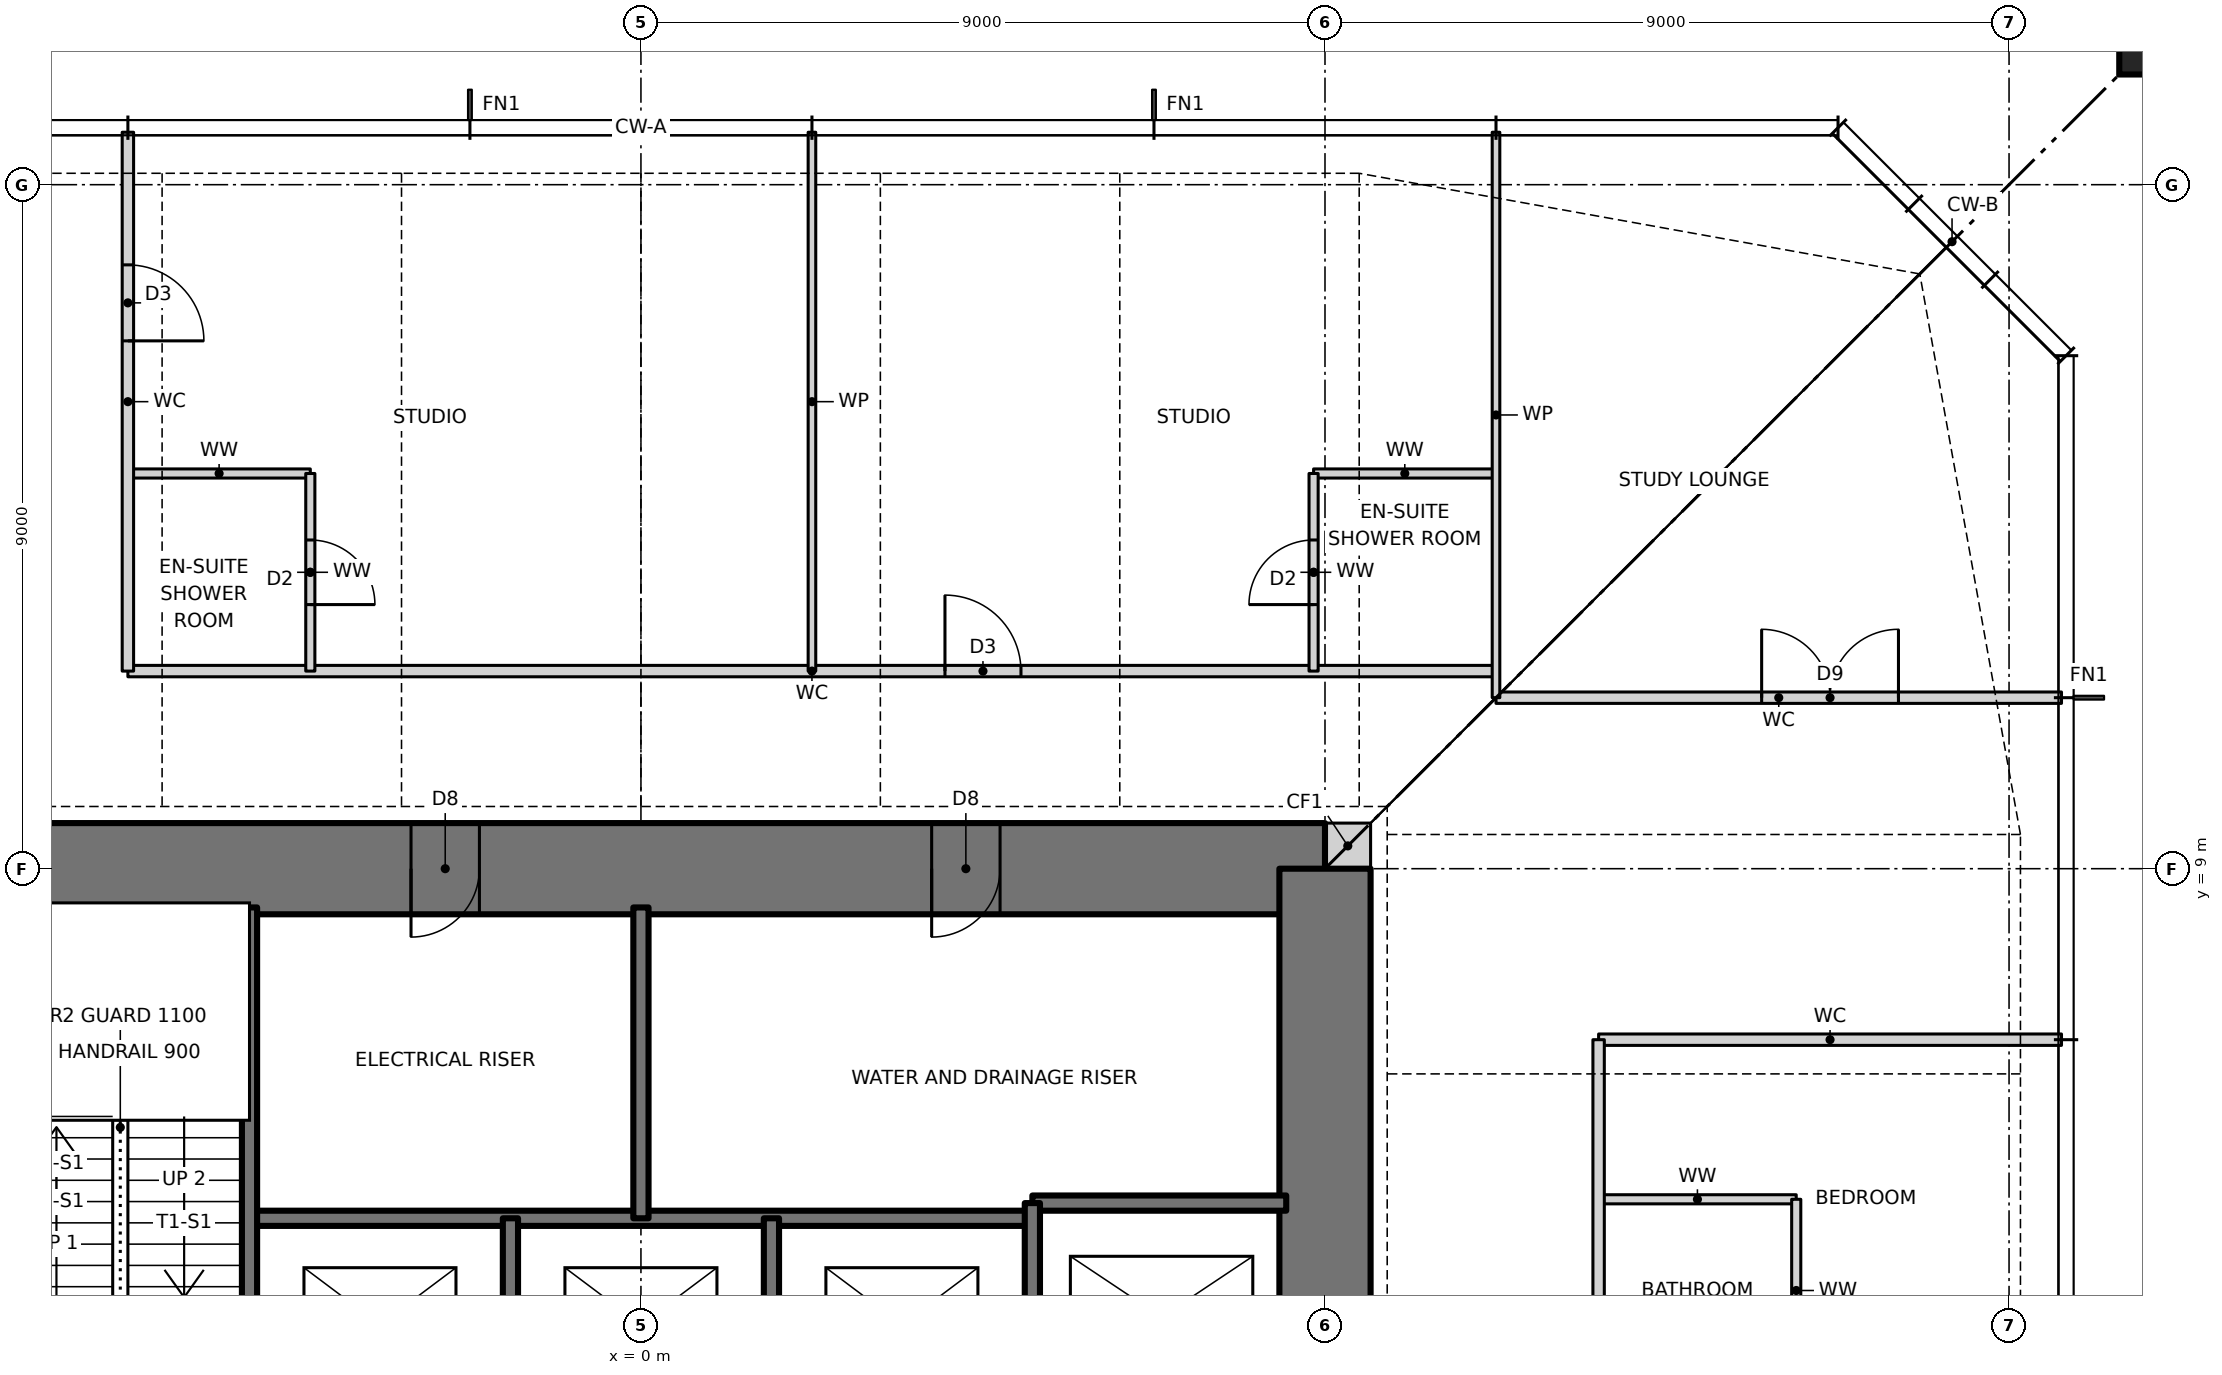
"""IFC4 building model, lengths in metres.
Left out: names, types, materials, properties, quantities, classifications, styles, units other than length and angle.
Written with IfcOpenShell. Run it as: python <this file> out.ifc"""

import sys

from ifc_helpers import new_model, si_unit, direction, frame, frame_2d, origin, origin_2d, place, context, subcontext, project, spatial, rectangle, i_section, extrude, element, fill, save


model = new_model("IFC4")
c1 = context("Model", 3, precision=1e-05, world=origin(), true_north=direction((0.0, 1.0)))
c2 = subcontext(c1, "Body", "Model", "MODEL_VIEW")
j1 = project(units=[si_unit("LENGTHUNIT", "METRE"), si_unit("PLANEANGLEUNIT", "RADIAN")], contexts=[c1])
p1 = place(None, origin())
s1 = spatial("IfcSite", under=j1, at=p1, CompositionType="ELEMENT")
p2 = place(p1, origin())
s2 = spatial("IfcBuilding", under=s1, at=p2, CompositionType="ELEMENT")
p3 = place(p2, frame((0.0, 0.0, 205.5)))
s3 = spatial("IfcBuildingStorey", under=s2, at=p3, CompositionType="ELEMENT", Elevation=205.5)
p4 = place(p3, frame((21.65, 21.65, 0.0), z_axis=(0.0, 0.0, 1.0), x_axis=(1.0, 0.0, 0.0)))
e1 = element("IfcColumn", 1, at=p4, inside=s3, PredefinedType="COLUMN", context=c2, shape_type="SweptSolid", body=[
    extrude(rectangle(XDim=4.4, YDim=4.4, at=origin_2d()), origin(), (0.0, 0.0, 1.0), 3.5),
    extrude(i_section(OverallWidth=0.478, OverallDepth=0.599, WebThickness=0.1, FlangeThickness=0.14, at=origin_2d()), origin(), (0.0, 0.0, 1.0), 3.5),
])
p5 = place(p3, frame((9.0, 9.3, 0.0), z_axis=(0.0, 0.0, 1.0), x_axis=(1.0, 0.0, 0.0)))
e2 = element("IfcWall", 2, at=p5, inside=s3, PredefinedType="SOLIDWALL", context=c2, shape_type="SweptSolid", body=[
    extrude(rectangle(XDim=0.6, YDim=0.6, at=frame_2d((0.3, 0.0))), origin(), (0.0, 0.0, 1.0), 3.5),
])
p6 = place(p3, frame((9.0, 9.0, 0.0), z_axis=(0.0, 0.0, 1.0), x_axis=(-1.0, 0.0, 0.0)))
e3 = element("IfcWall", 3, at=p6, inside=s3, PredefinedType="SHEAR", context=c2, shape_type="SweptSolid", body=[
    extrude(rectangle(XDim=18.0, YDim=1.2, at=frame_2d((9.0, 0.0))), origin(), (0.0, 0.0, 1.0), 3.5),
])
p7 = place(p6, frame((11.125, 0.0, 0.0)))
e4 = element("IfcOpeningElement", 4, at=p7, cuts=e3, PredefinedType="OPENING", context=c2, shape_type="SweptSolid", body=[
    extrude(rectangle(XDim=0.9, YDim=2.1, at=frame_2d((0.45, 1.05))), frame((0.0, 0.61, 0.0), z_axis=(0.0, -1.0, 0.0), x_axis=(1.0, 0.0, 0.0)), (0.0, 0.0, 1.0), 1.22),
])
p8 = place(p6, frame((4.275, 0.0, 0.0)))
e5 = element("IfcOpeningElement", 5, at=p8, cuts=e3, PredefinedType="OPENING", context=c2, shape_type="SweptSolid", body=[
    extrude(rectangle(XDim=0.9, YDim=2.1, at=frame_2d((0.45, 1.05))), frame((0.0, 0.61, 0.0), z_axis=(0.0, -1.0, 0.0), x_axis=(1.0, 0.0, 0.0)), (0.0, 0.0, 1.0), 1.22),
])
p9 = place(p3, frame((9.0, -9.0, 0.0), z_axis=(0.0, 0.0, 1.0), x_axis=(0.0, 1.0, 0.0)))
e6 = element("IfcWall", 6, at=p9, inside=s3, PredefinedType="SHEAR", context=c2, shape_type="SweptSolid", body=[
    extrude(rectangle(XDim=18.0, YDim=1.2, at=frame_2d((9.0, 0.0))), origin(), (0.0, 0.0, 1.0), 3.5),
])
p10 = place(p9, frame((8.5, 0.0, 0.0)))
e7 = element("IfcOpeningElement", 7, at=p10, cuts=e6, PredefinedType="OPENING", context=c2, shape_type="SweptSolid", body=[
    extrude(rectangle(XDim=1.0, YDim=2.1, at=frame_2d((0.5, 1.05))), frame((0.0, 0.61, 0.0), z_axis=(0.0, -1.0, 0.0), x_axis=(1.0, 0.0, 0.0)), (0.0, 0.0, 1.0), 1.22),
])
p11 = place(p3, frame((-5.15, 4.4, 0.0), z_axis=(0.0, 0.0, 1.0), x_axis=(1.0, 0.0, 0.0)))
e8 = element("IfcWall", 8, at=p11, inside=s3, PredefinedType="SOLIDWALL", context=c2, shape_type="SweptSolid", body=[
    extrude(rectangle(XDim=10.3, YDim=0.2, at=frame_2d((5.15, 0.0))), origin(), (0.0, 0.0, 1.0), 3.5),
])
p12 = place(p3, frame((5.15, 4.6, 0.0), z_axis=(0.0, 0.0, 1.0), x_axis=(1.0, 0.0, 0.0)))
e9 = element("IfcWall", 9, at=p12, inside=s3, PredefinedType="SOLIDWALL", context=c2, shape_type="SweptSolid", body=[
    extrude(rectangle(XDim=3.34, YDim=0.2, at=frame_2d((1.67, 0.0))), origin(), (0.0, 0.0, 1.0), 3.5),
])
p13 = place(p3, frame((12.6, 4.65, 0.0), z_axis=(0.0, 0.0, 1.0), x_axis=(1.0, 0.0, 0.0)))
e10 = element("IfcWall", 10, at=p13, inside=s3, PredefinedType="PARTITIONING", context=c2, shape_type="SweptSolid", body=[
    extrude(rectangle(XDim=2.6, YDim=0.12, at=frame_2d((1.3, 0.0))), origin(), (0.0, 0.0, 1.0), 3.2),
])
p14 = place(p3, frame((12.6, 6.75, 0.0), z_axis=(0.0, 0.0, 1.0), x_axis=(1.0, 0.0, 0.0)))
e11 = element("IfcWall", 11, at=p14, inside=s3, PredefinedType="PARTITIONING", context=c2, shape_type="SweptSolid", body=[
    extrude(rectangle(XDim=6.09, YDim=0.15, at=frame_2d((3.045, 0.0))), origin(), (0.0, 0.0, 1.0), 3.2),
])
p15 = place(p3, frame((11.25, 11.25, 0.0), z_axis=(0.0, 0.0, 1.0), x_axis=(1.0, 0.0, 0.0)))
e12 = element("IfcWall", 12, at=p15, inside=s3, PredefinedType="PARTITIONING", context=c2, shape_type="SweptSolid", body=[
    extrude(rectangle(XDim=7.44, YDim=0.15, at=frame_2d((3.72, 0.0))), origin(), (0.0, 0.0, 1.0), 3.2),
])
p16 = place(p15, frame((3.495, 0.0, 0.0)))
e13 = element("IfcOpeningElement", 13, at=p16, cuts=e12, PredefinedType="OPENING", context=c2, shape_type="SweptSolid", body=[
    extrude(rectangle(XDim=1.8, YDim=2.1, at=frame_2d((0.9, 1.05))), frame((0.0, 0.085, 0.0), z_axis=(0.0, -1.0, 0.0), x_axis=(1.0, 0.0, 0.0)), (0.0, 0.0, 1.0), 0.17),
])
p17 = place(p3, frame((-6.75, 11.6, 0.0), z_axis=(0.0, 0.0, 1.0), x_axis=(1.0, 0.0, 0.0)))
e14 = element("IfcWall", 14, at=p17, inside=s3, PredefinedType="PARTITIONING", context=c2, shape_type="SweptSolid", body=[
    extrude(rectangle(XDim=18.0, YDim=0.15, at=frame_2d((9.0, 0.0))), origin(), (0.0, 0.0, 1.0), 3.2),
])
p18 = place(p17, frame((10.75, 0.0, 0.0)))
e15 = element("IfcOpeningElement", 15, at=p18, cuts=e14, PredefinedType="OPENING", context=c2, shape_type="SweptSolid", body=[
    extrude(rectangle(XDim=1.0, YDim=2.1, at=frame_2d((0.5, 1.05))), frame((0.0, 0.085, 0.0), z_axis=(0.0, -1.0, 0.0), x_axis=(1.0, 0.0, 0.0)), (0.0, 0.0, 1.0), 0.17),
])
for number, where, z_axis, x_axis in (
    (16, (-6.75, 14.2, 0.0), (0.0, 0.0, 1.0), (1.0, 0.0, 0.0)),
    (17, (8.85, 14.2, 0.0), (0.0, 0.0, 1.0), (1.0, 0.0, 0.0)),
    (18, (15.2, 2.25, 0.0), (0.0, 0.0, 1.0), (0.0, 1.0, 0.0)),
):
    element("IfcWall", number, at=place(p3, frame(where, z_axis=z_axis, x_axis=x_axis)), inside=s3, PredefinedType="PARTITIONING", context=c2, shape_type="SweptSolid", body=[
        extrude(rectangle(XDim=2.4, YDim=0.12, at=frame_2d((1.2, 0.0))), origin(), (0.0, 0.0, 1.0), 3.2),
    ])
p19 = place(p3, frame((12.6, -11.25, 0.0), z_axis=(0.0, 0.0, 1.0), x_axis=(0.0, 1.0, 0.0)))
e19 = element("IfcWall", 19, at=p19, inside=s3, PredefinedType="PARTITIONING", context=c2, shape_type="SweptSolid", body=[
    extrude(rectangle(XDim=18.0, YDim=0.15, at=frame_2d((9.0, 0.0))), origin(), (0.0, 0.0, 1.0), 3.2),
])
p20 = place(p19, frame((1.35, 0.0, 0.0)))
e20 = element("IfcOpeningElement", 20, at=p20, cuts=e19, PredefinedType="OPENING", context=c2, shape_type="SweptSolid", body=[
    extrude(rectangle(XDim=1.8, YDim=2.1, at=frame_2d((0.9, 1.05))), frame((0.0, 0.085, 0.0), z_axis=(0.0, -1.0, 0.0), x_axis=(1.0, 0.0, 0.0)), (0.0, 0.0, 1.0), 0.17),
])
p21 = place(p19, frame((5.05, 0.0, 0.0)))
e21 = element("IfcOpeningElement", 21, at=p21, cuts=e19, PredefinedType="OPENING", context=c2, shape_type="SweptSolid", body=[
    extrude(rectangle(XDim=1.0, YDim=2.1, at=frame_2d((0.5, 1.05))), frame((0.0, 0.085, 0.0), z_axis=(0.0, -1.0, 0.0), x_axis=(1.0, 0.0, 0.0)), (0.0, 0.0, 1.0), 0.17),
])
p22 = place(p19, frame((12.1, 0.0, 0.0)))
e22 = element("IfcOpeningElement", 22, at=p22, cuts=e19, PredefinedType="OPENING", context=c2, shape_type="SweptSolid", body=[
    extrude(rectangle(XDim=1.0, YDim=2.1, at=frame_2d((0.5, 1.05))), frame((0.0, 0.085, 0.0), z_axis=(0.0, -1.0, 0.0), x_axis=(1.0, 0.0, 0.0)), (0.0, 0.0, 1.0), 0.17),
])
p23 = place(p3, frame((11.25, 11.25, 0.0), z_axis=(0.0, 0.0, 1.0), x_axis=(0.0, 1.0, 0.0)))
e23 = element("IfcWall", 23, at=p23, inside=s3, PredefinedType="PARTITIONING", context=c2, shape_type="SweptSolid", body=[
    extrude(rectangle(XDim=7.44, YDim=0.1, at=frame_2d((3.72, 0.0))), origin(), (0.0, 0.0, 1.0), 3.2),
])
p24 = place(p3, frame((8.85, 11.6, 0.0), z_axis=(0.0, 0.0, 1.0), x_axis=(0.0, 1.0, 0.0)))
e24 = element("IfcWall", 24, at=p24, inside=s3, PredefinedType="PARTITIONING", context=c2, shape_type="SweptSolid", body=[
    extrude(rectangle(XDim=2.6, YDim=0.12, at=frame_2d((1.3, 0.0))), origin(), (0.0, 0.0, 1.0), 3.2),
])
p25 = place(p24, frame((0.875, 0.0, 0.0)))
e25 = element("IfcOpeningElement", 25, at=p25, cuts=e24, PredefinedType="OPENING", context=c2, shape_type="SweptSolid", body=[
    extrude(rectangle(XDim=0.85, YDim=2.1, at=frame_2d((0.425, 1.05))), frame((0.0, 0.07, 0.0), z_axis=(0.0, -1.0, 0.0), x_axis=(1.0, 0.0, 0.0)), (0.0, 0.0, 1.0), 0.14),
])
p26 = place(p3, frame((5.15, -8.49, 0.0), z_axis=(0.0, 0.0, 1.0), x_axis=(0.0, 1.0, 0.0)))
e26 = element("IfcWall", 26, at=p26, inside=s3, PredefinedType="SOLIDWALL", context=c2, shape_type="SweptSolid", body=[
    extrude(rectangle(XDim=13.09, YDim=0.2, at=frame_2d((6.545, 0.0))), origin(), (0.0, 0.0, 1.0), 3.5),
])
p27 = place(p26, frame((7.89, 0.0, 0.0)))
e27 = element("IfcOpeningElement", 27, at=p27, cuts=e26, PredefinedType="OPENING", context=c2, shape_type="SweptSolid", body=[
    extrude(rectangle(XDim=1.2, YDim=2.1, at=frame_2d((0.6, 1.05))), frame((0.0, 0.11, 0.0), z_axis=(0.0, -1.0, 0.0), x_axis=(1.0, 0.0, 0.0)), (0.0, 0.0, 1.0), 0.22),
])
p28 = place(p3, frame((2.25, 11.6, 0.0), z_axis=(0.0, 0.0, 1.0), x_axis=(0.0, 1.0, 0.0)))
e28 = element("IfcWall", 28, at=p28, inside=s3, PredefinedType="PARTITIONING", context=c2, shape_type="SweptSolid", body=[
    extrude(rectangle(XDim=7.09, YDim=0.1, at=frame_2d((3.545, 0.0))), origin(), (0.0, 0.0, 1.0), 3.2),
])
p29 = place(p3, frame((1.717, 1.6, 0.0), z_axis=(0.0, 0.0, 1.0), x_axis=(0.0, 1.0, 0.0)))
e29 = element("IfcWall", 29, at=p29, inside=s3, PredefinedType="SOLIDWALL", context=c2, shape_type="SweptSolid", body=[
    extrude(rectangle(XDim=2.8, YDim=0.2, at=frame_2d((1.4, 0.0))), origin(), (0.0, 0.0, 1.0), 3.5),
])
p30 = place(p3, frame((0.0, 4.4, 0.0), z_axis=(0.0, 0.0, 1.0), x_axis=(0.0, 1.0, 0.0)))
e30 = element("IfcWall", 30, at=p30, inside=s3, PredefinedType="SOLIDWALL", context=c2, shape_type="SweptSolid", body=[
    extrude(rectangle(XDim=4.09, YDim=0.2, at=frame_2d((2.045, 0.0))), origin(), (0.0, 0.0, 1.0), 3.5),
])
p31 = place(p3, frame((-1.717, 1.6, 0.0), z_axis=(0.0, 0.0, 1.0), x_axis=(0.0, 1.0, 0.0)))
e31 = element("IfcWall", 31, at=p31, inside=s3, PredefinedType="SOLIDWALL", context=c2, shape_type="SweptSolid", body=[
    extrude(rectangle(XDim=2.8, YDim=0.2, at=frame_2d((1.4, 0.0))), origin(), (0.0, 0.0, 1.0), 3.5),
])
p32 = place(p3, frame((-4.35, 11.6, 0.0), z_axis=(0.0, 0.0, 1.0), x_axis=(0.0, 1.0, 0.0)))
e32 = element("IfcWall", 32, at=p32, inside=s3, PredefinedType="PARTITIONING", context=c2, shape_type="SweptSolid", body=[
    extrude(rectangle(XDim=2.6, YDim=0.12, at=frame_2d((1.3, 0.0))), origin(), (0.0, 0.0, 1.0), 3.2),
])
p33 = place(p32, frame((0.875, 0.0, 0.0)))
e33 = element("IfcOpeningElement", 33, at=p33, cuts=e32, PredefinedType="OPENING", context=c2, shape_type="SweptSolid", body=[
    extrude(rectangle(XDim=0.85, YDim=2.1, at=frame_2d((0.425, 1.05))), frame((0.0, 0.07, 0.0), z_axis=(0.0, -1.0, 0.0), x_axis=(1.0, 0.0, 0.0)), (0.0, 0.0, 1.0), 0.14),
])
p34 = place(p3, frame((-5.15, 1.6, 0.0), z_axis=(0.0, 0.0, 1.0), x_axis=(0.0, 1.0, 0.0)))
e34 = element("IfcWall", 34, at=p34, inside=s3, PredefinedType="SOLIDWALL", context=c2, shape_type="SweptSolid", body=[
    extrude(rectangle(XDim=6.89, YDim=0.2, at=frame_2d((3.445, 0.0))), origin(), (0.0, 0.0, 1.0), 3.5),
])
p35 = place(p3, frame((-6.75, 11.6, 0.0), z_axis=(0.0, 0.0, 1.0), x_axis=(0.0, 1.0, 0.0)))
e35 = element("IfcWall", 35, at=p35, inside=s3, PredefinedType="PARTITIONING", context=c2, shape_type="SweptSolid", body=[
    extrude(rectangle(XDim=7.09, YDim=0.15, at=frame_2d((3.545, 0.0))), origin(), (0.0, 0.0, 1.0), 3.2),
])
p36 = place(p35, frame((4.345, 0.0, 0.0)))
e36 = element("IfcOpeningElement", 36, at=p36, cuts=e35, PredefinedType="OPENING", context=c2, shape_type="SweptSolid", body=[
    extrude(rectangle(XDim=1.0, YDim=2.1, at=frame_2d((0.5, 1.05))), frame((0.0, 0.085, 0.0), z_axis=(0.0, -1.0, 0.0), x_axis=(1.0, 0.0, 0.0)), (0.0, 0.0, 1.0), 0.17),
])
p37 = place(p18, origin())
e37 = element("IfcDoor", 37, at=p37, inside=s3, OperationType="SINGLE_SWING_LEFT", PredefinedType="DOOR", context=c2, shape_type="SweptSolid", body=[
    extrude(rectangle(XDim=1.0, YDim=2.1, at=frame_2d((0.5, 1.05))), frame((0.0, 0.025, 0.0), z_axis=(0.0, -1.0, 0.0), x_axis=(1.0, 0.0, 0.0)), (0.0, 0.0, 1.0), 0.05),
])
fill(e15, e37)
p38 = place(p25, origin())
e38 = element("IfcDoor", 38, at=p38, inside=s3, OperationType="SINGLE_SWING_LEFT", PredefinedType="DOOR", context=c2, shape_type="SweptSolid", body=[
    extrude(rectangle(XDim=0.85, YDim=2.1, at=frame_2d((0.425, 1.05))), frame((0.0, 0.025, 0.0), z_axis=(0.0, -1.0, 0.0), x_axis=(1.0, 0.0, 0.0)), (0.0, 0.0, 1.0), 0.05),
])
fill(e25, e38)
p39 = place(p36, frame((1.0, 0.0, 0.0), z_axis=(0.0, 0.0, 1.0), x_axis=(-1.0, 0.0, 0.0)))
e39 = element("IfcDoor", 39, at=p39, inside=s3, OperationType="SINGLE_SWING_RIGHT", PredefinedType="DOOR", context=c2, shape_type="SweptSolid", body=[
    extrude(rectangle(XDim=1.0, YDim=2.1, at=frame_2d((0.5, 1.05))), frame((0.0, 0.025, 0.0), z_axis=(0.0, -1.0, 0.0), x_axis=(1.0, 0.0, 0.0)), (0.0, 0.0, 1.0), 0.05),
])
fill(e36, e39)
p40 = place(p33, frame((0.85, 0.0, 0.0), z_axis=(0.0, 0.0, 1.0), x_axis=(-1.0, 0.0, 0.0)))
e40 = element("IfcDoor", 40, at=p40, inside=s3, OperationType="SINGLE_SWING_RIGHT", PredefinedType="DOOR", context=c2, shape_type="SweptSolid", body=[
    extrude(rectangle(XDim=0.85, YDim=2.1, at=frame_2d((0.425, 1.05))), frame((0.0, 0.025, 0.0), z_axis=(0.0, -1.0, 0.0), x_axis=(1.0, 0.0, 0.0)), (0.0, 0.0, 1.0), 0.05),
])
fill(e33, e40)
p41 = place(p16, origin())
e41 = element("IfcDoor", 41, at=p41, inside=s3, OperationType="DOUBLE_DOOR_SINGLE_SWING", PredefinedType="DOOR", context=c2, shape_type="SweptSolid", body=[
    extrude(rectangle(XDim=1.8, YDim=2.1, at=frame_2d((0.9, 1.05))), frame((0.0, 0.025, 0.0), z_axis=(0.0, -1.0, 0.0), x_axis=(1.0, 0.0, 0.0)), (0.0, 0.0, 1.0), 0.05),
])
fill(e13, e41)
p42 = place(p7, origin())
e42 = element("IfcDoor", 42, at=p42, inside=s3, OperationType="SINGLE_SWING_RIGHT", PredefinedType="DOOR", context=c2, shape_type="SweptSolid", body=[
    extrude(rectangle(XDim=0.9, YDim=2.1, at=frame_2d((0.45, 1.05))), frame((0.0, 0.025, 0.0), z_axis=(0.0, -1.0, 0.0), x_axis=(1.0, 0.0, 0.0)), (0.0, 0.0, 1.0), 0.05),
])
fill(e4, e42)
p43 = place(p8, origin())
e43 = element("IfcDoor", 43, at=p43, inside=s3, OperationType="SINGLE_SWING_RIGHT", PredefinedType="DOOR", context=c2, shape_type="SweptSolid", body=[
    extrude(rectangle(XDim=0.9, YDim=2.1, at=frame_2d((0.45, 1.05))), frame((0.0, 0.025, 0.0), z_axis=(0.0, -1.0, 0.0), x_axis=(1.0, 0.0, 0.0)), (0.0, 0.0, 1.0), 0.05),
])
fill(e5, e43)
save(model, sys.argv[1])
